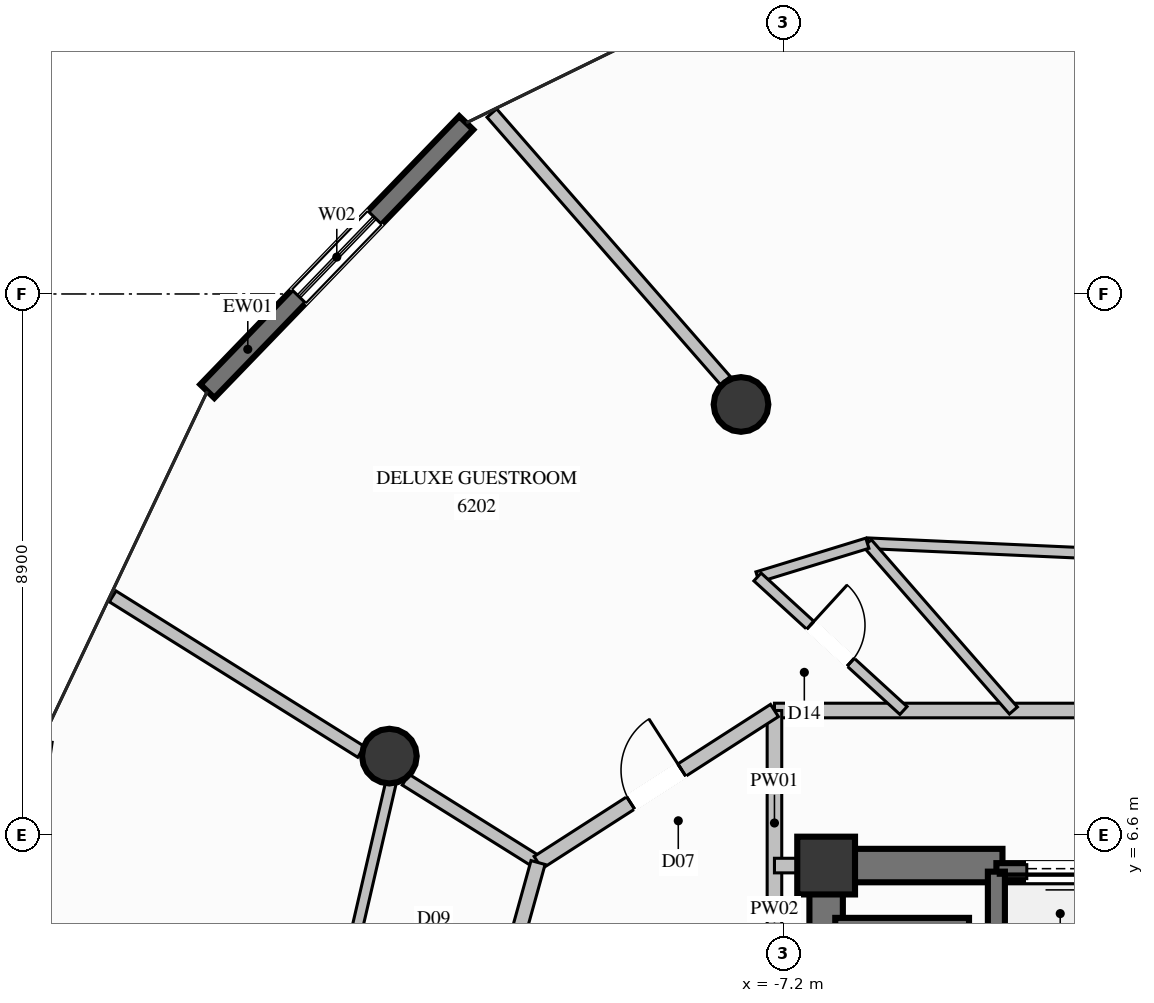
"""IFC4 building model, lengths in metres.
Left out: names, types, materials, properties, quantities, classifications, styles, units other than length and angle.
Written with IfcOpenShell. Run it as: python <this file> out.ifc"""

import sys

from ifc_helpers import new_model, si_unit, direction, frame, frame_2d, origin, origin_2d, place, context, subcontext, project, spatial, rectangle, circle, extrude, element, fill, save


model = new_model("IFC4")
c1 = context("Model", 3, precision=1e-05, world=origin(), true_north=direction((0.0, 1.0)))
c2 = subcontext(c1, "Body", "Model", "MODEL_VIEW")
j1 = project(units=[si_unit("LENGTHUNIT", "METRE"), si_unit("PLANEANGLEUNIT", "RADIAN")], contexts=[c1])
p1 = place(None, origin())
s1 = spatial("IfcSite", under=j1, at=p1, CompositionType="ELEMENT")
p2 = place(p1, origin())
s2 = spatial("IfcBuilding", under=s1, at=p2, CompositionType="ELEMENT")
p3 = place(p2, frame((0.0, 0.0, 230.8)))
s3 = spatial("IfcBuildingStorey", under=s2, at=p3, CompositionType="ELEMENT", Elevation=230.8)
p4 = place(p3, frame((-6.5, 6.1, 0.0), z_axis=(0.0, 0.0, 1.0), x_axis=(1.0, 0.0, 0.0)))
e1 = element("IfcColumn", 1, at=p4, inside=s3, PredefinedType="COLUMN", context=c2, shape_type="SweptSolid", body=[
    extrude(rectangle(XDim=0.95, YDim=0.95, at=origin_2d()), origin(), (0.0, 0.0, 1.0), 3.6),
])
p5 = place(p3, frame((-6.225, 6.1, 0.0), z_axis=(0.0, 0.0, 1.0), x_axis=(1.0, 0.0, 0.0)))
e2 = element("IfcWall", 2, at=p5, inside=s3, PredefinedType="SHEAR", context=c2, shape_type="SweptSolid", body=[
    extrude(rectangle(XDim=2.625, YDim=0.55, at=frame_2d((1.312, 0.0))), origin(), (0.0, 0.0, 1.0), 3.6),
])
p6 = place(p3, frame((-6.5, 2.35, 0.0), z_axis=(0.0, 0.0, 1.0), x_axis=(0.0, 1.0, 0.0)))
e3 = element("IfcWall", 3, at=p6, inside=s3, PredefinedType="SHEAR", context=c2, shape_type="SweptSolid", body=[
    extrude(rectangle(XDim=4.025, YDim=0.55, at=frame_2d((2.012, 0.0))), origin(), (0.0, 0.0, 1.0), 3.6),
])
for number, where, z_axis, x_axis in (
    (4, (-7.9, 13.683, 0.0), (0.0, 0.0, 1.0), (1.0, 0.0, 0.0)),
    (5, (-13.683, 7.9, 0.0), (0.0, 0.0, 1.0), (1.0, 0.0, 0.0)),
):
    element("IfcColumn", number, at=place(p3, frame(where, z_axis=z_axis, x_axis=x_axis)), inside=s3, PredefinedType="COLUMN", context=c2, shape_type="SweptSolid", body=[
        extrude(circle(Radius=0.45, at=origin_2d()), origin(), (0.0, 0.0, 1.0), 3.6),
    ])
p7 = place(p3, frame((-16.677, 13.901, 0.0), z_axis=(0.0, 0.0, 1.0), x_axis=(0.694433198018, 0.71955717875, 0.0)))
e6 = element("IfcWall", 6, at=p7, inside=s3, PredefinedType="SOLIDWALL", context=c2, shape_type="SweptSolid", body=[
    extrude(rectangle(XDim=6.132, YDim=0.32, at=frame_2d((3.066, 0.0))), origin(), (0.0, 0.0, 1.0), 3.2),
])
p8 = place(p7, frame((2.166, 0.0, 0.35)))
e7 = element("IfcOpeningElement", 7, at=p8, cuts=e6, PredefinedType="OPENING", context=c2, shape_type="SweptSolid", body=[
    extrude(rectangle(XDim=1.8, YDim=2.6, at=frame_2d((0.9, 1.3))), frame((0.0, 0.17, 0.0), z_axis=(0.0, -1.0, 0.0), x_axis=(1.0, 0.0, 0.0)), (0.0, 0.0, 1.0), 0.34),
])
p9 = place(p3, frame((-1.6, 6.0, 0.0), z_axis=(0.0, 0.0, 1.0), x_axis=(-1.0, 0.0, 0.0)))
e8 = element("IfcWall", 8, at=p9, inside=s3, PredefinedType="SOLIDWALL", context=c2, shape_type="SweptSolid", body=[
    extrude(rectangle(XDim=2.1, YDim=0.28, at=frame_2d((1.05, 0.0))), origin(), (0.0, 0.0, 1.0), 3.2),
])
p10 = place(p9, frame((0.5, 0.0, 0.0)))
e9 = element("IfcOpeningElement", 9, at=p10, cuts=e8, PredefinedType="OPENING", context=c2, shape_type="SweptSolid", body=[
    extrude(rectangle(XDim=1.1, YDim=2.02, at=frame_2d((0.55, 1.01))), frame((0.0, 0.15, 0.0), z_axis=(0.0, -1.0, 0.0), x_axis=(1.0, 0.0, 0.0)), (0.0, 0.0, 1.0), 0.3),
])
p11 = place(p3, frame((-3.7, 6.0, 0.0), z_axis=(0.0, 0.0, 1.0), x_axis=(0.0, -1.0, 0.0)))
e10 = element("IfcWall", 10, at=p11, inside=s3, PredefinedType="SOLIDWALL", context=c2, shape_type="SweptSolid", body=[
    extrude(rectangle(XDim=2.5, YDim=0.28, at=frame_2d((1.25, 0.0))), origin(), (0.0, 0.0, 1.0), 3.2),
])
p12 = place(p3, frame((-4.15, 5.1, 0.0), z_axis=(0.0, 0.0, 1.0), x_axis=(-1.0, 0.0, 0.0)))
e11 = element("IfcWall", 11, at=p12, inside=s3, PredefinedType="SOLIDWALL", context=c2, shape_type="SweptSolid", body=[
    extrude(rectangle(XDim=2.2, YDim=0.28, at=frame_2d((1.1, 0.0))), origin(), (0.0, 0.0, 1.0), 3.2),
])
p13 = place(p3, frame((-7.35, 8.65, 0.0), z_axis=(0.0, 0.0, 1.0), x_axis=(1.0, 0.0, 0.0)))
e12 = element("IfcWall", 12, at=p13, inside=s3, PredefinedType="PARTITIONING", context=c2, shape_type="SweptSolid", body=[
    extrude(rectangle(XDim=13.1, YDim=0.24, at=frame_2d((6.55, 0.0))), origin(), (0.0, 0.0, 1.0), 3.2),
])
p14 = place(p3, frame((-7.35, 4.95, 0.0), z_axis=(0.0, 0.0, 1.0), x_axis=(0.0, 1.0, 0.0)))
e13 = element("IfcWall", 13, at=p14, inside=s3, PredefinedType="PARTITIONING", context=c2, shape_type="SweptSolid", body=[
    extrude(rectangle(XDim=3.7, YDim=0.24, at=frame_2d((1.85, 0.0))), origin(), (0.0, 0.0, 1.0), 3.2),
])
p15 = place(p3, frame((-7.35, 6.1, 0.0), z_axis=(0.0, 0.0, 1.0), x_axis=(1.0, 0.0, 0.0)))
e14 = element("IfcWall", 14, at=p15, inside=s3, PredefinedType="PARTITIONING", context=c2, shape_type="SweptSolid", body=[
    extrude(rectangle(XDim=0.85, YDim=0.24, at=frame_2d((0.425, 0.0))), origin(), (0.0, 0.0, 1.0), 3.2),
])
p16 = place(p3, frame((-11.238, 6.15, 0.0), z_axis=(0.0, 0.0, 1.0), x_axis=(-0.847683196706, 0.530502778524, 0.0)))
e15 = element("IfcWall", 15, at=p16, inside=s3, PredefinedType="PARTITIONING", context=c2, shape_type="SweptSolid", body=[
    extrude(rectangle(XDim=2.569, YDim=0.21, at=frame_2d((1.285, 0.0))), origin(), (0.0, 0.0, 1.0), 2.067),
])
p17 = place(p3, frame((-14.148, 7.97, 0.0), z_axis=(0.0, 0.0, 1.0), x_axis=(-0.84767945367, 0.530508759425, 0.0)))
e16 = element("IfcWall", 16, at=p17, inside=s3, PredefinedType="PARTITIONING", context=c2, shape_type="SweptSolid", body=[
    extrude(rectangle(XDim=4.82, YDim=0.21, at=frame_2d((2.41, 0.0))), origin(), (0.0, 0.0, 1.0), 3.2),
])
p18 = place(p3, frame((-5.822, 11.401, 0.0), z_axis=(0.0, 0.0, 1.0), x_axis=(0.99898352798, -0.045076721529, 0.0)))
e17 = element("IfcWall", 17, at=p18, inside=s3, PredefinedType="PLUMBINGWALL", context=c2, shape_type="SweptSolid", body=[
    extrude(rectangle(XDim=3.748, YDim=0.175, at=frame_2d((1.874, 0.0))), origin(), (0.0, 0.0, 1.0), 3.2),
])
p19 = place(p3, frame((-5.822, 11.401, 0.0), z_axis=(0.0, 0.0, 1.0), x_axis=(0.657728098428, -0.753255433793, 0.0)))
e18 = element("IfcWall", 18, at=p19, inside=s3, PredefinedType="PLUMBINGWALL", context=c2, shape_type="SweptSolid", body=[
    extrude(rectangle(XDim=3.652, YDim=0.175, at=frame_2d((1.826, 0.0))), origin(), (0.0, 0.0, 1.0), 2.067),
])
p20 = place(p3, frame((-8.157, 14.076, 0.0), z_axis=(0.0, 0.0, 1.0), x_axis=(-0.657708106677, 0.753272889736, 0.0)))
e19 = element("IfcWall", 19, at=p20, inside=s3, PredefinedType="PARTITIONING", context=c2, shape_type="SweptSolid", body=[
    extrude(rectangle(XDim=5.84, YDim=0.21, at=frame_2d((2.92, 0.0))), origin(), (0.0, 0.0, 1.0), 3.2),
])
p21 = place(p3, frame((-7.629, 10.846, 0.0), z_axis=(0.0, 0.0, 1.0), x_axis=(0.955932477138, 0.293586612692, 0.0)))
e20 = element("IfcWall", 20, at=p21, inside=s3, PredefinedType="PLUMBINGWALL", context=c2, shape_type="SweptSolid", body=[
    extrude(rectangle(XDim=1.89, YDim=0.175, at=frame_2d((0.945, 0.0))), origin(), (0.0, 0.0, 1.0), 3.2),
])
p22 = place(p3, frame((-7.629, 10.846, 0.0), z_axis=(0.0, 0.0, 1.0), x_axis=(0.737882530439, -0.674929160189, 0.0)))
e21 = element("IfcWall", 21, at=p22, inside=s3, PredefinedType="PLUMBINGWALL", context=c2, shape_type="SweptSolid", body=[
    extrude(rectangle(XDim=3.254, YDim=0.175, at=frame_2d((1.627, 0.0))), origin(), (0.0, 0.0, 1.0), 2.067),
])
p23 = place(p22, frame((1.177, 0.0, 0.0)))
e22 = element("IfcOpeningElement", 22, at=p23, cuts=e21, PredefinedType="OPENING", context=c2, shape_type="SweptSolid", body=[
    extrude(rectangle(XDim=0.9, YDim=2.02, at=frame_2d((0.45, 1.01))), frame((0.0, 0.098, 0.0), z_axis=(0.0, -1.0, 0.0), x_axis=(1.0, 0.0, 0.0)), (0.0, 0.0, 1.0), 0.195),
])
p24 = place(p3, frame((-11.238, 6.15, 0.0), z_axis=(0.0, 0.0, 1.0), x_axis=(0.841118406986, 0.540851019625, 0.0)))
e23 = element("IfcWall", 23, at=p24, inside=s3, PredefinedType="PARTITIONING", context=c2, shape_type="SweptSolid", body=[
    extrude(rectangle(XDim=4.622, YDim=0.24, at=frame_2d((2.311, 0.0))), origin(), (0.0, 0.0, 1.0), 3.2),
])
p25 = place(p24, frame((1.811, 0.0, 0.0)))
e24 = element("IfcOpeningElement", 24, at=p25, cuts=e23, PredefinedType="OPENING", context=c2, shape_type="SweptSolid", body=[
    extrude(rectangle(XDim=1.0, YDim=2.2, at=frame_2d((0.5, 1.1))), frame((0.0, 0.13, 0.0), z_axis=(0.0, -1.0, 0.0), x_axis=(1.0, 0.0, 0.0)), (0.0, 0.0, 1.0), 0.26),
])
p26 = place(p3, frame((-11.238, 6.15, 0.0), z_axis=(0.0, 0.0, 1.0), x_axis=(-0.267361785392, -0.963596220266, 0.0)))
e25 = element("IfcWall", 25, at=p26, inside=s3, PredefinedType="PARTITIONING", context=c2, shape_type="SweptSolid", body=[
    extrude(rectangle(XDim=2.768, YDim=0.24, at=frame_2d((1.384, 0.0))), origin(), (0.0, 0.0, 1.0), 3.2),
])
p27 = place(p3, frame((-13.617, 7.638, 0.0), z_axis=(0.0, 0.0, 1.0), x_axis=(-0.225743113999, -0.974186864253, 0.0)))
e26 = element("IfcWall", 26, at=p27, inside=s3, PredefinedType="PLUMBINGWALL", context=c2, shape_type="SweptSolid", body=[
    extrude(rectangle(XDim=3.349, YDim=0.175, at=frame_2d((1.675, 0.0))), origin(), (0.0, 0.0, 1.0), 2.769),
])
p28 = place(p8, origin())
e27 = element("IfcWindow", 27, at=p28, inside=s3, PartitioningType="SINGLE_PANEL", PredefinedType="WINDOW", context=c2, shape_type="SweptSolid", body=[
    extrude(rectangle(XDim=1.8, YDim=2.6, at=frame_2d((0.9, 1.3))), frame((0.0, 0.03, 0.0), z_axis=(0.0, -1.0, 0.0), x_axis=(1.0, 0.0, 0.0)), (0.0, 0.0, 1.0), 0.06),
])
fill(e7, e27)
p29 = place(p10, origin())
e28 = element("IfcDoor", 28, at=p29, inside=s3, OperationType="SLIDING_TO_LEFT", PredefinedType="DOOR", context=c2, shape_type="SweptSolid", body=[
    extrude(rectangle(XDim=1.1, YDim=2.02, at=frame_2d((0.55, 1.01))), frame((0.0, 0.025, 0.0), z_axis=(0.0, -1.0, 0.0), x_axis=(1.0, 0.0, 0.0)), (0.0, 0.0, 1.0), 0.05),
])
fill(e9, e28)
p30 = place(p23, origin())
e29 = element("IfcDoor", 29, at=p30, inside=s3, OperationType="SINGLE_SWING_LEFT", PredefinedType="DOOR", context=c2, shape_type="SweptSolid", body=[
    extrude(rectangle(XDim=0.9, YDim=2.02, at=frame_2d((0.45, 1.01))), frame((0.0, 0.025, 0.0), z_axis=(0.0, -1.0, 0.0), x_axis=(1.0, 0.0, 0.0)), (0.0, 0.0, 1.0), 0.05),
])
fill(e22, e29)
p31 = place(p25, origin())
e30 = element("IfcDoor", 30, at=p31, inside=s3, OperationType="SINGLE_SWING_RIGHT", PredefinedType="DOOR", context=c2, shape_type="SweptSolid", body=[
    extrude(rectangle(XDim=1.0, YDim=2.2, at=frame_2d((0.5, 1.1))), frame((0.0, 0.025, 0.0), z_axis=(0.0, -1.0, 0.0), x_axis=(1.0, 0.0, 0.0)), (0.0, 0.0, 1.0), 0.05),
])
fill(e24, e30)
save(model, sys.argv[1])
